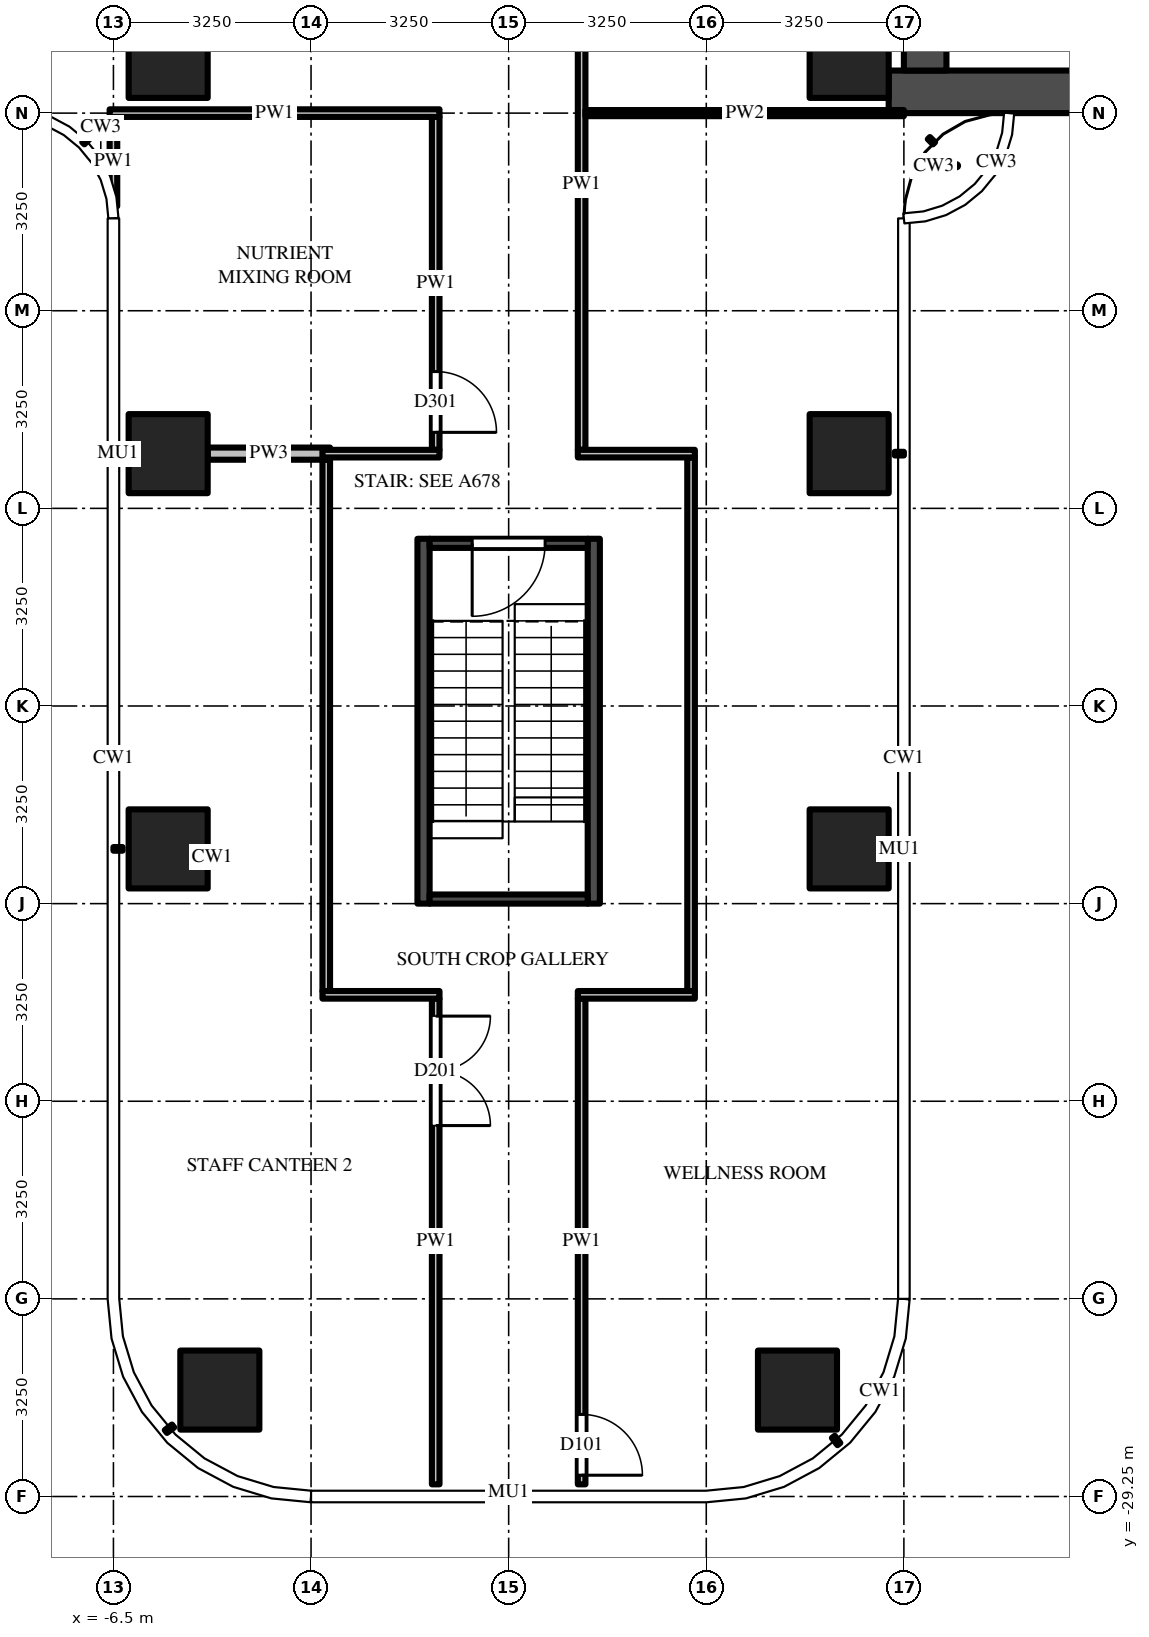
"""IFC4 building model, lengths in metres.
Left out: names, types, materials, properties, quantities, classifications, styles, units other than length and angle.
Written with IfcOpenShell. Run it as: python <this file> out.ifc"""

import sys

from ifc_helpers import new_model, si_unit, direction, frame, frame_2d, origin, origin_2d, place, context, subcontext, project, spatial, polyline, rectangle, outline, extrude, source, transform, mapped, element, fill, save


model = new_model("IFC4")
c1 = context("Model", 3, precision=1e-05, world=origin(), true_north=direction((0.0, 1.0)))
c2 = subcontext(c1, "Body", "Model", "MODEL_VIEW")
j1 = project(units=[si_unit("LENGTHUNIT", "METRE"), si_unit("PLANEANGLEUNIT", "RADIAN")], contexts=[c1])
p1 = place(None, origin())
s1 = spatial("IfcSite", under=j1, at=p1, CompositionType="ELEMENT")
p2 = place(p1, origin())
s2 = spatial("IfcBuilding", under=s1, at=p2, CompositionType="ELEMENT")
p3 = place(p2, frame((0.0, 0.0, 115.5)))
s3 = spatial("IfcBuildingStorey", under=s2, at=p3, CompositionType="ELEMENT", Elevation=115.5)
m1 = source(origin(), c2, "Body", "SweptSolid", [
    extrude(rectangle(XDim=1.3, YDim=1.3, at=origin_2d()), origin(), (0.0, 0.0, 1.0), 4.5),
])
for number, where, z_axis, x_axis in (
    (1, (5.6, -5.6, 0.0), (0.0, 0.0, 1.0), (1.0, 0.0, 0.0)),
    (2, (-5.6, -5.6, 0.0), (0.0, 0.0, 1.0), (1.0, 0.0, 0.0)),
    (3, (5.6, -12.1, 0.0), (0.0, 0.0, 1.0), (1.0, 0.0, 0.0)),
    (4, (5.6, -18.6, 0.0), (0.0, 0.0, 1.0), (1.0, 0.0, 0.0)),
    (5, (4.75, -27.5, 0.0), (0.0, 0.0, 1.0), (1.0, 0.0, 0.0)),
    (6, (-5.6, -12.1, 0.0), (0.0, 0.0, 1.0), (1.0, 0.0, 0.0)),
    (7, (-5.6, -18.6, 0.0), (0.0, 0.0, 1.0), (1.0, 0.0, 0.0)),
    (8, (-4.75, -27.5, 0.0), (0.0, 0.0, 1.0), (1.0, 0.0, 0.0)),
):
    element("IfcColumn", number, at=place(p3, frame(where, z_axis=z_axis, x_axis=x_axis)), inside=s3, PredefinedType="COLUMN", context=c2, shape_type="MappedRepresentation", body=[
        mapped(m1, transform((0.0, 0.0, 0.0))),
    ])
m2 = source(origin(), c2, "Body", "SweptSolid", [
    extrude(rectangle(XDim=16.5, YDim=0.7, at=frame_2d((8.25, 0.0))), origin(), (0.0, 0.0, 1.0), 4.25),
])
p4 = place(p3, frame((6.25, -6.15, 0.0), z_axis=(0.0, 0.0, 1.0), x_axis=(1.0, 0.0, 0.0)))
e9 = element("IfcWall", 9, at=p4, inside=s3, PredefinedType="SHEAR", context=c2, shape_type="MappedRepresentation", body=[
    mapped(m2, transform((0.0, 0.0, 0.0))),
])
m3 = source(origin(), c2, "Body", "SweptSolid", [
    extrude(rectangle(XDim=9.05, YDim=0.7, at=frame_2d((4.525, 0.0))), origin(), (0.0, 0.0, 1.0), 4.25),
])
p5 = place(p3, frame((6.85, -5.8, 0.0), z_axis=(0.0, 0.0, 1.0), x_axis=(0.0, 1.0, 0.0)))
e10 = element("IfcWall", 10, at=p5, inside=s3, PredefinedType="SHEAR", context=c2, shape_type="MappedRepresentation", body=[
    mapped(m3, transform((0.0, 0.0, 0.0))),
])
m4 = source(origin(), c2, "Body", "SweptSolid", [
    extrude(rectangle(XDim=1.8, YDim=2.1, at=frame_2d((0.9, 1.05))), frame((0.0, 0.36, 0.0), z_axis=(0.0, -1.0, 0.0), x_axis=(1.0, 0.0, 0.0)), (0.0, 0.0, 1.0), 0.72),
])
p6 = place(p5, frame((3.15, 0.0, 0.0)))
e11 = element("IfcOpeningElement", 11, at=p6, cuts=e10, PredefinedType="OPENING", context=c2, shape_type="MappedRepresentation", body=[
    mapped(m4, transform((0.0, 0.0, 0.0))),
])
m5 = source(origin(), c2, "Body", "SweptSolid", [
    extrude(rectangle(XDim=6.0, YDim=0.2, at=frame_2d((3.0, 0.0))), origin(), (0.0, 0.0, 1.0), 4.25),
])
for number, where, z_axis, x_axis in (
    (12, (1.4, -13.5, 0.0), (0.0, 0.0, 1.0), (0.0, -1.0, 0.0)),
    (13, (-1.4, -13.5, 0.0), (0.0, 0.0, 1.0), (0.0, -1.0, 0.0)),
):
    element("IfcWall", number, at=place(p3, frame(where, z_axis=z_axis, x_axis=x_axis)), inside=s3, PredefinedType="SHEAR", context=c2, shape_type="MappedRepresentation", body=[
        mapped(m5, transform((0.0, 0.0, 0.0))),
    ])
m6 = source(origin(), c2, "Body", "SweptSolid", [
    extrude(rectangle(XDim=2.6, YDim=0.15, at=frame_2d((1.3, 0.0))), origin(), (0.0, 0.0, 1.0), 4.25),
])
p7 = place(p3, frame((1.3, -13.575, 0.0), z_axis=(0.0, 0.0, 1.0), x_axis=(-1.0, 0.0, 0.0)))
e14 = element("IfcWall", 14, at=p7, inside=s3, PredefinedType="SHEAR", context=c2, shape_type="MappedRepresentation", body=[
    mapped(m6, transform((0.0, 0.0, 0.0))),
])
m7 = source(origin(), c2, "Body", "SweptSolid", [
    extrude(rectangle(XDim=1.2, YDim=2.1, at=frame_2d((0.6, 1.05))), frame((0.0, 0.085, 0.0), z_axis=(0.0, -1.0, 0.0), x_axis=(1.0, 0.0, 0.0)), (0.0, 0.0, 1.0), 0.17),
])
p8 = place(p7, frame((0.7, 0.0, 0.0)))
e15 = element("IfcOpeningElement", 15, at=p8, cuts=e14, PredefinedType="OPENING", context=c2, shape_type="MappedRepresentation", body=[
    mapped(m7, transform((0.0, 0.0, 0.0))),
])
p9 = place(p3, frame((1.3, -19.425, 0.0), z_axis=(0.0, 0.0, 1.0), x_axis=(-1.0, 0.0, 0.0)))
e16 = element("IfcWall", 16, at=p9, inside=s3, PredefinedType="SHEAR", context=c2, shape_type="MappedRepresentation", body=[
    mapped(m6, transform((0.0, 0.0, 0.0))),
])
p10 = place(p3, origin())
e17 = element("IfcWall", 17, at=p10, inside=s3, PredefinedType="USERDEFINED", context=c2, shape_type="SweptSolid", body=[
    extrude(outline(polyline([(8.823, -26.628), (8.364, -28.135), (8.077, -28.481), (7.615, -28.098), (7.825, -27.845), (8.219, -26.55), (8.179, -25.56), (8.113, -25.335), (8.688, -25.164), (8.776, -25.461), (8.823, -26.628)])), origin(), (0.0, 0.0, 1.0), 0.5),
])
m8 = source(origin(), c2, "Body", "SweptSolid", [
    extrude(rectangle(XDim=1.469, YDim=0.125, at=frame_2d((0.734, 0.0))), origin(), (0.0, 0.0, 1.0), 4.25),
])
p11 = place(p3, frame((-6.5, -6.562, 0.0), z_axis=(0.0, 0.0, 1.0), x_axis=(0.0, -1.0, 0.0)))
e18 = element("IfcWall", 18, at=p11, inside=s3, PredefinedType="PARTITIONING", context=c2, shape_type="MappedRepresentation", body=[
    mapped(m8, transform((0.0, 0.0, 0.0))),
])
m9 = source(origin(), c2, "Body", "SweptSolid", [
    extrude(rectangle(XDim=8.738, YDim=0.125, at=frame_2d((4.369, 0.0))), origin(), (0.0, 0.0, 1.0), 3.468),
])
p12 = place(p3, frame((-3.0, -20.938, 0.0), z_axis=(0.0, 0.0, 1.0), x_axis=(0.0, 1.0, 0.0)))
e19 = element("IfcWall", 19, at=p12, inside=s3, PredefinedType="PARTITIONING", context=c2, shape_type="MappedRepresentation", body=[
    mapped(m9, transform((0.0, 0.0, 0.0))),
])
m10 = source(origin(), c2, "Body", "SweptSolid", [
    extrude(rectangle(XDim=7.988, YDim=0.125, at=frame_2d((3.994, 0.0))), origin(), (0.0, 0.0, 1.0), 3.33),
])
p13 = place(p3, frame((-1.2, -21.062, 0.0), z_axis=(0.0, 0.0, 1.0), x_axis=(0.0, -1.0, 0.0)))
e20 = element("IfcWall", 20, at=p13, inside=s3, PredefinedType="PARTITIONING", context=c2, shape_type="MappedRepresentation", body=[
    mapped(m10, transform((0.0, 0.0, 0.0))),
])
m11 = source(origin(), c2, "Body", "SweptSolid", [
    extrude(rectangle(XDim=1.8, YDim=2.1, at=frame_2d((0.9, 1.05))), frame((0.0, 0.073, 0.0), z_axis=(0.0, -1.0, 0.0), x_axis=(1.0, 0.0, 0.0)), (0.0, 0.0, 1.0), 0.145),
])
p14 = place(p13, frame((0.288, 0.0, 0.0)))
e21 = element("IfcOpeningElement", 21, at=p14, cuts=e20, PredefinedType="OPENING", context=c2, shape_type="MappedRepresentation", body=[
    mapped(m11, transform((0.0, 0.0, 0.0))),
])
m12 = source(origin(), c2, "Body", "SweptSolid", [
    extrude(rectangle(XDim=5.475, YDim=0.125, at=frame_2d((2.738, 0.0))), origin(), (0.0, 0.0, 1.0), 3.468),
])
p15 = place(p3, frame((-1.2, -6.562, 0.0), z_axis=(0.0, 0.0, 1.0), x_axis=(0.0, -1.0, 0.0)))
e22 = element("IfcWall", 22, at=p15, inside=s3, PredefinedType="PARTITIONING", context=c2, shape_type="MappedRepresentation", body=[
    mapped(m12, transform((0.0, 0.0, 0.0))),
])
m13 = source(origin(), c2, "Body", "SweptSolid", [
    extrude(rectangle(XDim=1.0, YDim=2.1, at=frame_2d((0.5, 1.05))), frame((0.0, 0.073, 0.0), z_axis=(0.0, -1.0, 0.0), x_axis=(1.0, 0.0, 0.0)), (0.0, 0.0, 1.0), 0.145),
])
p16 = place(p15, frame((4.188, 0.0, 0.0)))
e23 = element("IfcOpeningElement", 23, at=p16, cuts=e22, PredefinedType="OPENING", context=c2, shape_type="MappedRepresentation", body=[
    mapped(m13, transform((0.0, 0.0, 0.0))),
])
p17 = place(p3, frame((1.2, -21.062, 0.0), z_axis=(0.0, 0.0, 1.0), x_axis=(0.0, -1.0, 0.0)))
e24 = element("IfcWall", 24, at=p17, inside=s3, PredefinedType="PARTITIONING", context=c2, shape_type="MappedRepresentation", body=[
    mapped(m10, transform((0.0, 0.0, 0.0))),
])
p18 = place(p17, frame((6.837, 0.0, 0.0)))
e25 = element("IfcOpeningElement", 25, at=p18, cuts=e24, PredefinedType="OPENING", context=c2, shape_type="MappedRepresentation", body=[
    mapped(m13, transform((0.0, 0.0, 0.0))),
])
m14 = source(origin(), c2, "Body", "SweptSolid", [
    extrude(rectangle(XDim=8.725, YDim=0.125, at=frame_2d((4.363, 0.0))), origin(), (0.0, 0.0, 1.0), 3.468),
])
p19 = place(p3, frame((1.2, -3.312, 0.0), z_axis=(0.0, 0.0, 1.0), x_axis=(0.0, -1.0, 0.0)))
e26 = element("IfcWall", 26, at=p19, inside=s3, PredefinedType="PARTITIONING", context=c2, shape_type="MappedRepresentation", body=[
    mapped(m14, transform((0.0, 0.0, 0.0))),
])
m15 = source(origin(), c2, "Body", "SweptSolid", [
    extrude(rectangle(XDim=8.775, YDim=0.125, at=frame_2d((4.387, 0.0))), origin(), (0.0, 0.0, 1.0), 3.468),
])
p20 = place(p3, frame((3.0, -12.163, 0.0), z_axis=(0.0, 0.0, 1.0), x_axis=(0.0, -1.0, 0.0)))
e27 = element("IfcWall", 27, at=p20, inside=s3, PredefinedType="PARTITIONING", context=c2, shape_type="MappedRepresentation", body=[
    mapped(m15, transform((0.0, 0.0, 0.0))),
])
m16 = source(origin(), c2, "Body", "SweptSolid", [
    extrude(rectangle(XDim=1.925, YDim=0.125, at=frame_2d((0.962, 0.0))), origin(), (0.0, 0.0, 1.0), 4.25),
])
for number, where, z_axis, x_axis in (
    (28, (-1.137, -21.0, 0.0), (0.0, 0.0, 1.0), (-1.0, 0.0, 0.0)),
    (29, (3.062, -21.0, 0.0), (0.0, 0.0, 1.0), (-1.0, 0.0, 0.0)),
):
    element("IfcWall", number, at=place(p3, frame(where, z_axis=z_axis, x_axis=x_axis)), inside=s3, PredefinedType="PARTITIONING", context=c2, shape_type="MappedRepresentation", body=[
        mapped(m16, transform((0.0, 0.0, 0.0))),
    ])
m17 = source(origin(), c2, "Body", "SweptSolid", [
    extrude(rectangle(XDim=2.012, YDim=0.2, at=frame_2d((1.006, 0.0))), origin(), (0.0, 0.0, 1.0), 3.468),
])
p21 = place(p3, frame((-4.95, -12.1, 0.0), z_axis=(0.0, 0.0, 1.0), x_axis=(1.0, 0.0, 0.0)))
e30 = element("IfcWall", 30, at=p21, inside=s3, PredefinedType="PARTITIONING", context=c2, shape_type="MappedRepresentation", body=[
    mapped(m17, transform((0.0, 0.0, 0.0))),
])
m18 = source(origin(), c2, "Body", "SweptSolid", [
    extrude(rectangle(XDim=1.925, YDim=0.125, at=frame_2d((0.962, 0.0))), origin(), (0.0, 0.0, 1.0), 3.468),
])
for number, where, z_axis, x_axis in (
    (31, (-3.062, -12.1, 0.0), (0.0, 0.0, 1.0), (1.0, 0.0, 0.0)),
    (32, (1.137, -12.1, 0.0), (0.0, 0.0, 1.0), (1.0, 0.0, 0.0)),
):
    element("IfcWall", number, at=place(p3, frame(where, z_axis=z_axis, x_axis=x_axis)), inside=s3, PredefinedType="PARTITIONING", context=c2, shape_type="MappedRepresentation", body=[
        mapped(m18, transform((0.0, 0.0, 0.0))),
    ])
m19 = source(origin(), c2, "Body", "SweptSolid", [
    extrude(rectangle(XDim=5.238, YDim=0.1, at=frame_2d((2.619, 0.0))), origin(), (0.0, 0.0, 1.0), 3.33),
])
p22 = place(p3, frame((1.262, -6.5, 0.0), z_axis=(0.0, 0.0, 1.0), x_axis=(1.0, 0.0, 0.0)))
e33 = element("IfcWall", 33, at=p22, inside=s3, PredefinedType="PARTITIONING", context=c2, shape_type="MappedRepresentation", body=[
    mapped(m19, transform((0.0, 0.0, 0.0))),
])
m20 = source(origin(), c2, "Body", "SweptSolid", [
    extrude(rectangle(XDim=5.425, YDim=0.125, at=frame_2d((2.712, 0.0))), origin(), (0.0, 0.0, 1.0), 3.33),
])
p23 = place(p3, frame((-1.137, -6.5, 0.0), z_axis=(0.0, 0.0, 1.0), x_axis=(-1.0, 0.0, 0.0)))
e34 = element("IfcWall", 34, at=p23, inside=s3, PredefinedType="PARTITIONING", context=c2, shape_type="MappedRepresentation", body=[
    mapped(m20, transform((0.0, 0.0, 0.0))),
])
m21 = source(origin(), c2, "Body", "SweptSolid", [
    extrude(rectangle(XDim=1.2, YDim=2.1, at=frame_2d((0.6, 1.05))), frame((0.0, 0.025, 0.0), z_axis=(0.0, -1.0, 0.0), x_axis=(1.0, 0.0, 0.0)), (0.0, 0.0, 1.0), 0.05),
])
p24 = place(p8, origin())
e35 = element("IfcDoor", 35, at=p24, inside=s3, OperationType="SINGLE_SWING_RIGHT", PredefinedType="DOOR", context=c2, shape_type="MappedRepresentation", body=[
    mapped(m21, transform((0.0, 0.0, 0.0))),
])
fill(e15, e35)
m22 = source(origin(), c2, "Body", "SweptSolid", [
    extrude(rectangle(XDim=1.0, YDim=2.1, at=frame_2d((0.5, 1.05))), frame((0.0, 0.025, 0.0), z_axis=(0.0, -1.0, 0.0), x_axis=(1.0, 0.0, 0.0)), (0.0, 0.0, 1.0), 0.05),
])
p25 = place(p18, origin())
e36 = element("IfcDoor", 36, at=p25, inside=s3, OperationType="SINGLE_SWING_RIGHT", PredefinedType="DOOR", context=c2, shape_type="MappedRepresentation", body=[
    mapped(m22, transform((0.0, 0.0, 0.0))),
])
fill(e25, e36)
m23 = source(origin(), c2, "Body", "SweptSolid", [
    extrude(rectangle(XDim=1.8, YDim=2.1, at=frame_2d((0.9, 1.05))), frame((0.0, 0.025, 0.0), z_axis=(0.0, -1.0, 0.0), x_axis=(1.0, 0.0, 0.0)), (0.0, 0.0, 1.0), 0.05),
])
p26 = place(p14, origin())
e37 = element("IfcDoor", 37, at=p26, inside=s3, OperationType="DOUBLE_DOOR_SINGLE_SWING", PredefinedType="DOOR", context=c2, shape_type="MappedRepresentation", body=[
    mapped(m23, transform((0.0, 0.0, 0.0))),
])
fill(e21, e37)
p27 = place(p16, origin())
e38 = element("IfcDoor", 38, at=p27, inside=s3, OperationType="SINGLE_SWING_RIGHT", PredefinedType="DOOR", context=c2, shape_type="MappedRepresentation", body=[
    mapped(m22, transform((0.0, 0.0, 0.0))),
])
fill(e23, e38)
save(model, sys.argv[1])
